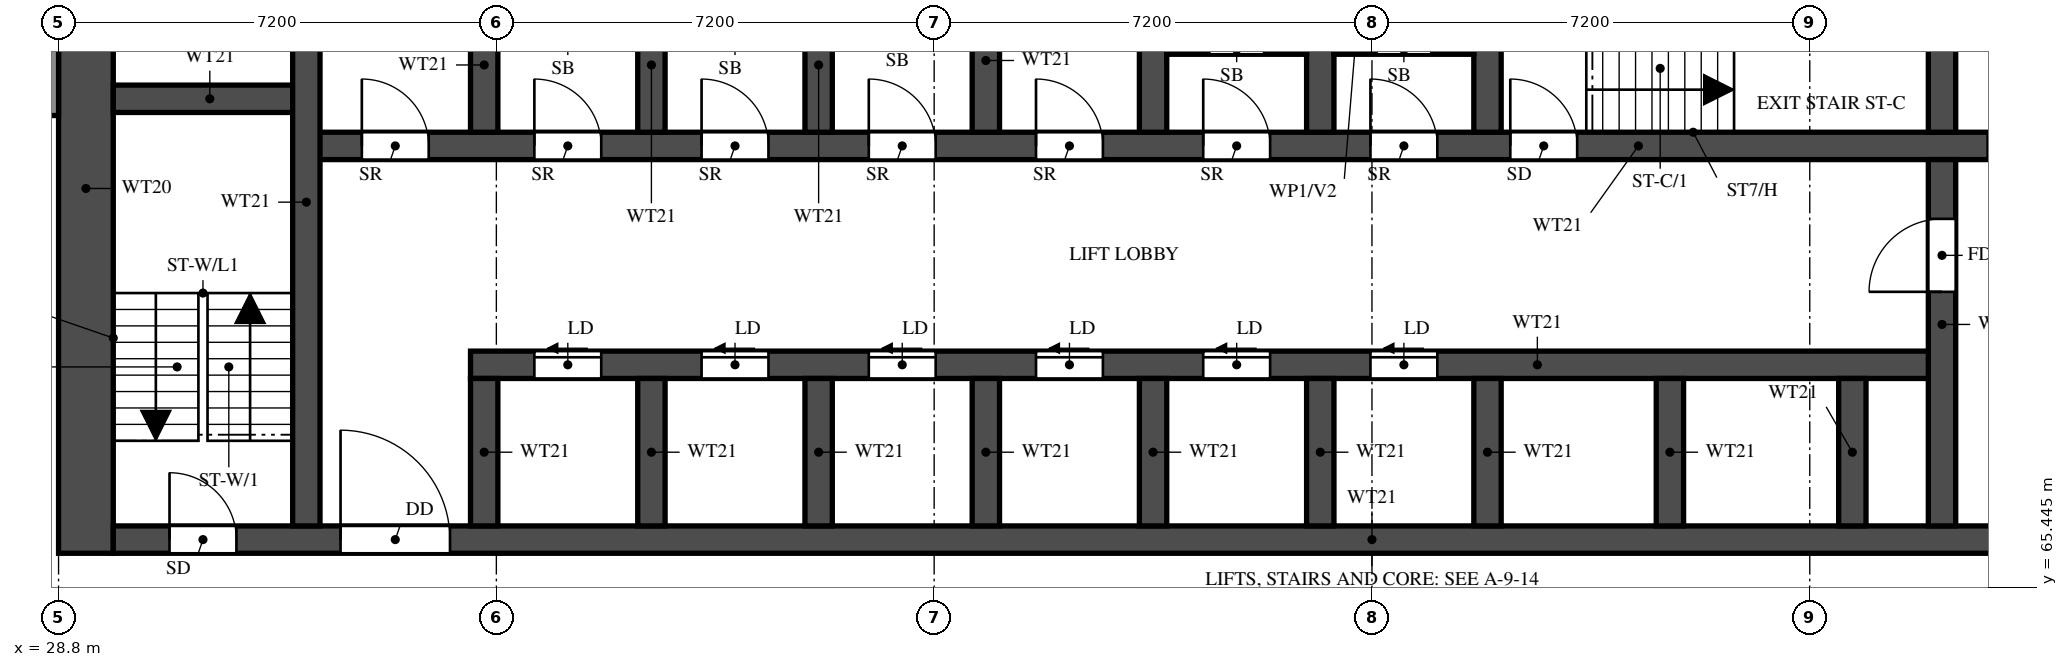
"""IFC4 building model, lengths in metres.
Left out: names, types, materials, properties, quantities, classifications, styles, units other than length and angle.
Written with IfcOpenShell. Run it as: python <this file> out.ifc"""

import sys

from ifc_helpers import new_model, si_unit, direction, frame, frame_2d, origin, place, context, subcontext, project, spatial, rectangle, extrude, element, fill, save


model = new_model("IFC4")
c1 = context("Model", 3, precision=1e-05, world=origin(), true_north=direction((0.0, 1.0)))
c2 = subcontext(c1, "Body", "Model", "MODEL_VIEW")
j1 = project(units=[si_unit("LENGTHUNIT", "METRE"), si_unit("PLANEANGLEUNIT", "RADIAN")], contexts=[c1])
p1 = place(None, origin())
s1 = spatial("IfcSite", under=j1, at=p1, CompositionType="ELEMENT")
p2 = place(p1, origin())
s2 = spatial("IfcBuilding", under=s1, at=p2, CompositionType="ELEMENT")
p3 = place(p2, frame((0.0, 0.0, 97.0)))
s3 = spatial("IfcBuildingStorey", under=s2, at=p3, CompositionType="ELEMENT", Elevation=97.0)
p4 = place(p3, frame((29.25, 66.0, 0.0), z_axis=(0.0, 0.0, 1.0), x_axis=(0.0, 1.0, 0.0)))
e1 = element("IfcWall", 1, at=p4, inside=s3, PredefinedType="SHEAR", context=c2, shape_type="SweptSolid", body=[
    extrude(rectangle(XDim=12.0, YDim=0.9, at=frame_2d((6.0, 0.0))), origin(), (0.0, 0.0, 1.0), 3.18),
])
p5 = place(p3, frame((29.7, 66.225, 0.0), z_axis=(0.0, 0.0, 1.0), x_axis=(1.0, 0.0, 0.0)))
e2 = element("IfcWall", 2, at=p5, inside=s3, PredefinedType="SHEAR", context=c2, shape_type="SweptSolid", body=[
    extrude(rectangle(XDim=41.4, YDim=0.45, at=frame_2d((20.7, 0.0))), origin(), (0.0, 0.0, 1.0), 3.18),
])
p6 = place(p5, frame((0.925, 0.0, 0.0)))
e3 = element("IfcOpeningElement", 3, at=p6, cuts=e2, PredefinedType="OPENING", context=c2, shape_type="SweptSolid", body=[
    extrude(rectangle(XDim=1.1, YDim=2.1, at=frame_2d((0.55, 1.05))), frame((0.0, 0.235, 0.0), z_axis=(0.0, -1.0, 0.0), x_axis=(1.0, 0.0, 0.0)), (0.0, 0.0, 1.0), 0.47),
])
p7 = place(p5, frame((3.738, 0.0, 0.0)))
e4 = element("IfcOpeningElement", 4, at=p7, cuts=e2, PredefinedType="OPENING", context=c2, shape_type="SweptSolid", body=[
    extrude(rectangle(XDim=1.8, YDim=2.1, at=frame_2d((0.9, 1.05))), frame((0.0, 0.235, 0.0), z_axis=(0.0, -1.0, 0.0), x_axis=(1.0, 0.0, 0.0)), (0.0, 0.0, 1.0), 0.47),
])
p8 = place(p3, frame((35.575, 69.1, 0.0), z_axis=(0.0, 0.0, 1.0), x_axis=(1.0, 0.0, 0.0)))
e5 = element("IfcWall", 5, at=p8, inside=s3, PredefinedType="SHEAR", context=c2, shape_type="SweptSolid", body=[
    extrude(rectangle(XDim=24.2, YDim=0.45, at=frame_2d((12.1, 0.0))), origin(), (0.0, 0.0, 1.0), 3.18),
])
p9 = place(p8, frame((1.05, 0.0, 0.0)))
e6 = element("IfcOpeningElement", 6, at=p9, cuts=e5, PredefinedType="OPENING", context=c2, shape_type="SweptSolid", body=[
    extrude(rectangle(XDim=1.1, YDim=2.1, at=frame_2d((0.55, 1.05))), frame((0.0, 0.235, 0.0), z_axis=(0.0, -1.0, 0.0), x_axis=(1.0, 0.0, 0.0)), (0.0, 0.0, 1.0), 0.47),
])
p10 = place(p8, frame((3.8, 0.0, 0.0)))
e7 = element("IfcOpeningElement", 7, at=p10, cuts=e5, PredefinedType="OPENING", context=c2, shape_type="SweptSolid", body=[
    extrude(rectangle(XDim=1.1, YDim=2.1, at=frame_2d((0.55, 1.05))), frame((0.0, 0.235, 0.0), z_axis=(0.0, -1.0, 0.0), x_axis=(1.0, 0.0, 0.0)), (0.0, 0.0, 1.0), 0.47),
])
p11 = place(p8, frame((6.55, 0.0, 0.0)))
e8 = element("IfcOpeningElement", 8, at=p11, cuts=e5, PredefinedType="OPENING", context=c2, shape_type="SweptSolid", body=[
    extrude(rectangle(XDim=1.1, YDim=2.1, at=frame_2d((0.55, 1.05))), frame((0.0, 0.235, 0.0), z_axis=(0.0, -1.0, 0.0), x_axis=(1.0, 0.0, 0.0)), (0.0, 0.0, 1.0), 0.47),
])
p12 = place(p8, frame((9.3, 0.0, 0.0)))
e9 = element("IfcOpeningElement", 9, at=p12, cuts=e5, PredefinedType="OPENING", context=c2, shape_type="SweptSolid", body=[
    extrude(rectangle(XDim=1.1, YDim=2.1, at=frame_2d((0.55, 1.05))), frame((0.0, 0.235, 0.0), z_axis=(0.0, -1.0, 0.0), x_axis=(1.0, 0.0, 0.0)), (0.0, 0.0, 1.0), 0.47),
])
p13 = place(p8, frame((12.05, 0.0, 0.0)))
e10 = element("IfcOpeningElement", 10, at=p13, cuts=e5, PredefinedType="OPENING", context=c2, shape_type="SweptSolid", body=[
    extrude(rectangle(XDim=1.1, YDim=2.1, at=frame_2d((0.55, 1.05))), frame((0.0, 0.235, 0.0), z_axis=(0.0, -1.0, 0.0), x_axis=(1.0, 0.0, 0.0)), (0.0, 0.0, 1.0), 0.47),
])
p14 = place(p8, frame((14.8, 0.0, 0.0)))
e11 = element("IfcOpeningElement", 11, at=p14, cuts=e5, PredefinedType="OPENING", context=c2, shape_type="SweptSolid", body=[
    extrude(rectangle(XDim=1.1, YDim=2.1, at=frame_2d((0.55, 1.05))), frame((0.0, 0.235, 0.0), z_axis=(0.0, -1.0, 0.0), x_axis=(1.0, 0.0, 0.0)), (0.0, 0.0, 1.0), 0.47),
])
p15 = place(p3, frame((32.875, 72.7, 0.0), z_axis=(0.0, 0.0, 1.0), x_axis=(1.0, 0.0, 0.0)))
e12 = element("IfcWall", 12, at=p15, inside=s3, PredefinedType="SHEAR", context=c2, shape_type="SweptSolid", body=[
    extrude(rectangle(XDim=35.05, YDim=0.45, at=frame_2d((17.525, 0.0))), origin(), (0.0, 0.0, 1.0), 3.18),
])
p16 = place(p15, frame((19.8, 0.0, 0.0)))
e13 = element("IfcOpeningElement", 13, at=p16, cuts=e12, PredefinedType="OPENING", context=c2, shape_type="SweptSolid", body=[
    extrude(rectangle(XDim=1.1, YDim=2.1, at=frame_2d((0.55, 1.05))), frame((0.0, 0.235, 0.0), z_axis=(0.0, -1.0, 0.0), x_axis=(1.0, 0.0, 0.0)), (0.0, 0.0, 1.0), 0.47),
])
p17 = place(p15, frame((27.65, 0.0, 0.0)))
e14 = element("IfcOpeningElement", 14, at=p17, cuts=e12, PredefinedType="OPENING", context=c2, shape_type="SweptSolid", body=[
    extrude(rectangle(XDim=1.1, YDim=2.1, at=frame_2d((0.55, 1.05))), frame((0.0, 0.235, 0.0), z_axis=(0.0, -1.0, 0.0), x_axis=(1.0, 0.0, 0.0)), (0.0, 0.0, 1.0), 0.47),
])
p18 = place(p15, frame((30.25, 0.0, 0.0)))
e15 = element("IfcOpeningElement", 15, at=p18, cuts=e12, PredefinedType="OPENING", context=c2, shape_type="SweptSolid", body=[
    extrude(rectangle(XDim=1.1, YDim=2.1, at=frame_2d((0.55, 1.05))), frame((0.0, 0.235, 0.0), z_axis=(0.0, -1.0, 0.0), x_axis=(1.0, 0.0, 0.0)), (0.0, 0.0, 1.0), 0.47),
])
p19 = place(p15, frame((3.75, 0.0, 0.0)))
e16 = element("IfcOpeningElement", 16, at=p19, cuts=e12, PredefinedType="OPENING", context=c2, shape_type="SweptSolid", body=[
    extrude(rectangle(XDim=1.1, YDim=2.1, at=frame_2d((0.55, 1.05))), frame((0.0, 0.235, 0.0), z_axis=(0.0, -1.0, 0.0), x_axis=(1.0, 0.0, 0.0)), (0.0, 0.0, 1.0), 0.47),
])
p20 = place(p15, frame((6.5, 0.0, 0.0)))
e17 = element("IfcOpeningElement", 17, at=p20, cuts=e12, PredefinedType="OPENING", context=c2, shape_type="SweptSolid", body=[
    extrude(rectangle(XDim=1.1, YDim=2.1, at=frame_2d((0.55, 1.05))), frame((0.0, 0.235, 0.0), z_axis=(0.0, -1.0, 0.0), x_axis=(1.0, 0.0, 0.0)), (0.0, 0.0, 1.0), 0.47),
])
p21 = place(p15, frame((9.25, 0.0, 0.0)))
e18 = element("IfcOpeningElement", 18, at=p21, cuts=e12, PredefinedType="OPENING", context=c2, shape_type="SweptSolid", body=[
    extrude(rectangle(XDim=1.1, YDim=2.1, at=frame_2d((0.55, 1.05))), frame((0.0, 0.235, 0.0), z_axis=(0.0, -1.0, 0.0), x_axis=(1.0, 0.0, 0.0)), (0.0, 0.0, 1.0), 0.47),
])
p22 = place(p15, frame((12.0, 0.0, 0.0)))
e19 = element("IfcOpeningElement", 19, at=p22, cuts=e12, PredefinedType="OPENING", context=c2, shape_type="SweptSolid", body=[
    extrude(rectangle(XDim=1.1, YDim=2.1, at=frame_2d((0.55, 1.05))), frame((0.0, 0.235, 0.0), z_axis=(0.0, -1.0, 0.0), x_axis=(1.0, 0.0, 0.0)), (0.0, 0.0, 1.0), 0.47),
])
p23 = place(p15, frame((14.75, 0.0, 0.0)))
e20 = element("IfcOpeningElement", 20, at=p23, cuts=e12, PredefinedType="OPENING", context=c2, shape_type="SweptSolid", body=[
    extrude(rectangle(XDim=1.1, YDim=2.1, at=frame_2d((0.55, 1.05))), frame((0.0, 0.235, 0.0), z_axis=(0.0, -1.0, 0.0), x_axis=(1.0, 0.0, 0.0)), (0.0, 0.0, 1.0), 0.47),
])
p24 = place(p15, frame((17.5, 0.0, 0.0)))
e21 = element("IfcOpeningElement", 21, at=p24, cuts=e12, PredefinedType="OPENING", context=c2, shape_type="SweptSolid", body=[
    extrude(rectangle(XDim=1.1, YDim=2.1, at=frame_2d((0.55, 1.05))), frame((0.0, 0.235, 0.0), z_axis=(0.0, -1.0, 0.0), x_axis=(1.0, 0.0, 0.0)), (0.0, 0.0, 1.0), 0.47),
])
p25 = place(p15, frame((0.913, 0.0, 0.0)))
e22 = element("IfcOpeningElement", 22, at=p25, cuts=e12, PredefinedType="OPENING", context=c2, shape_type="SweptSolid", body=[
    extrude(rectangle(XDim=1.1, YDim=2.1, at=frame_2d((0.55, 1.05))), frame((0.0, 0.235, 0.0), z_axis=(0.0, -1.0, 0.0), x_axis=(1.0, 0.0, 0.0)), (0.0, 0.0, 1.0), 0.47),
])
p26 = place(p3, frame((29.7, 73.475, 0.0), z_axis=(0.0, 0.0, 1.0), x_axis=(1.0, 0.0, 0.0)))
e23 = element("IfcWall", 23, at=p26, inside=s3, PredefinedType="SHEAR", context=c2, shape_type="SweptSolid", body=[
    extrude(rectangle(XDim=3.175, YDim=0.45, at=frame_2d((1.587, 0.0))), origin(), (0.0, 0.0, 1.0), 3.18),
])
p27 = place(p3, frame((32.875, 66.45, 0.0), z_axis=(0.0, 0.0, 1.0), x_axis=(0.0, 1.0, 0.0)))
e24 = element("IfcWall", 24, at=p27, inside=s3, PredefinedType="SHEAR", context=c2, shape_type="SweptSolid", body=[
    extrude(rectangle(XDim=10.65, YDim=0.45, at=frame_2d((5.325, 0.0))), origin(), (0.0, 0.0, 1.0), 3.18),
])
p28 = place(p3, frame((59.775, 66.45, 0.0), z_axis=(0.0, 0.0, 1.0), x_axis=(0.0, 1.0, 0.0)))
e25 = element("IfcWall", 25, at=p28, inside=s3, PredefinedType="SHEAR", context=c2, shape_type="SweptSolid", body=[
    extrude(rectangle(XDim=6.025, YDim=0.45, at=frame_2d((3.013, 0.0))), origin(), (0.0, 0.0, 1.0), 3.18),
])
p29 = place(p28, frame((3.85, 0.0, 0.0)))
e26 = element("IfcOpeningElement", 26, at=p29, cuts=e25, PredefinedType="OPENING", context=c2, shape_type="SweptSolid", body=[
    extrude(rectangle(XDim=1.2, YDim=2.1, at=frame_2d((0.6, 1.05))), frame((0.0, 0.235, 0.0), z_axis=(0.0, -1.0, 0.0), x_axis=(1.0, 0.0, 0.0)), (0.0, 0.0, 1.0), 0.47),
])
p30 = place(p3, frame((59.775, 72.925, 0.0), z_axis=(0.0, 0.0, 1.0), x_axis=(0.0, 1.0, 0.0)))
e27 = element("IfcWall", 27, at=p30, inside=s3, PredefinedType="SHEAR", context=c2, shape_type="SweptSolid", body=[
    extrude(rectangle(XDim=2.95, YDim=0.45, at=frame_2d((1.475, 0.0))), origin(), (0.0, 0.0, 1.0), 3.18),
])
for number, where, z_axis, x_axis in (
    (28, (35.8, 66.45, 0.0), (0.0, 0.0, 1.0), (0.0, 1.0, 0.0)),
    (29, (38.55, 66.45, 0.0), (0.0, 0.0, 1.0), (0.0, 1.0, 0.0)),
    (30, (41.3, 66.45, 0.0), (0.0, 0.0, 1.0), (0.0, 1.0, 0.0)),
    (31, (44.05, 66.45, 0.0), (0.0, 0.0, 1.0), (0.0, 1.0, 0.0)),
    (32, (46.8, 66.45, 0.0), (0.0, 0.0, 1.0), (0.0, 1.0, 0.0)),
    (33, (49.55, 66.45, 0.0), (0.0, 0.0, 1.0), (0.0, 1.0, 0.0)),
    (34, (52.3, 66.45, 0.0), (0.0, 0.0, 1.0), (0.0, 1.0, 0.0)),
    (35, (55.3, 66.45, 0.0), (0.0, 0.0, 1.0), (0.0, 1.0, 0.0)),
    (36, (58.3, 66.45, 0.0), (0.0, 0.0, 1.0), (0.0, 1.0, 0.0)),
):
    element("IfcWall", number, at=place(p3, frame(where, z_axis=z_axis, x_axis=x_axis)), inside=s3, PredefinedType="SHEAR", context=c2, shape_type="SweptSolid", body=[
        extrude(rectangle(XDim=2.425, YDim=0.45, at=frame_2d((1.212, 0.0))), origin(), (0.0, 0.0, 1.0), 3.18),
    ])
for number, where, z_axis, x_axis in (
    (37, (35.8, 72.925, 0.0), (0.0, 0.0, 1.0), (0.0, 1.0, 0.0)),
    (38, (38.55, 72.925, 0.0), (0.0, 0.0, 1.0), (0.0, 1.0, 0.0)),
    (39, (41.3, 72.925, 0.0), (0.0, 0.0, 1.0), (0.0, 1.0, 0.0)),
    (40, (44.05, 72.925, 0.0), (0.0, 0.0, 1.0), (0.0, 1.0, 0.0)),
    (41, (46.8, 72.925, 0.0), (0.0, 0.0, 1.0), (0.0, 1.0, 0.0)),
    (42, (49.55, 72.925, 0.0), (0.0, 0.0, 1.0), (0.0, 1.0, 0.0)),
    (43, (52.3, 72.925, 0.0), (0.0, 0.0, 1.0), (0.0, 1.0, 0.0)),
):
    element("IfcWall", number, at=place(p3, frame(where, z_axis=z_axis, x_axis=x_axis)), inside=s3, PredefinedType="SHEAR", context=c2, shape_type="SweptSolid", body=[
        extrude(rectangle(XDim=2.95, YDim=0.45, at=frame_2d((1.475, 0.0))), origin(), (0.0, 0.0, 1.0), 3.18),
    ])
p31 = place(p3, frame((47.025, 74.282, 0.0), z_axis=(0.0, 0.0, 1.0), x_axis=(1.0, 0.0, 0.0)))
e44 = element("IfcWall", 44, at=p31, inside=s3, PredefinedType="PARTITIONING", context=c2, shape_type="SweptSolid", body=[
    extrude(rectangle(XDim=2.3, YDim=0.15, at=frame_2d((1.15, 0.0))), origin(), (0.0, 0.0, 1.0), 3.18),
])
p32 = place(p31, frame((0.7, 0.0, 0.0)))
e45 = element("IfcOpeningElement", 45, at=p32, cuts=e44, PredefinedType="OPENING", context=c2, shape_type="SweptSolid", body=[
    extrude(rectangle(XDim=0.9, YDim=2.1, at=frame_2d((0.45, 1.05))), frame((0.0, 0.085, 0.0), z_axis=(0.0, -1.0, 0.0), x_axis=(1.0, 0.0, 0.0)), (0.0, 0.0, 1.0), 0.17),
])
p33 = place(p3, frame((49.775, 74.282, 0.0), z_axis=(0.0, 0.0, 1.0), x_axis=(1.0, 0.0, 0.0)))
e46 = element("IfcWall", 46, at=p33, inside=s3, PredefinedType="PARTITIONING", context=c2, shape_type="SweptSolid", body=[
    extrude(rectangle(XDim=2.3, YDim=0.15, at=frame_2d((1.15, 0.0))), origin(), (0.0, 0.0, 1.0), 3.18),
])
p34 = place(p33, frame((0.7, 0.0, 0.0)))
e47 = element("IfcOpeningElement", 47, at=p34, cuts=e46, PredefinedType="OPENING", context=c2, shape_type="SweptSolid", body=[
    extrude(rectangle(XDim=0.9, YDim=2.1, at=frame_2d((0.45, 1.05))), frame((0.0, 0.085, 0.0), z_axis=(0.0, -1.0, 0.0), x_axis=(1.0, 0.0, 0.0)), (0.0, 0.0, 1.0), 0.17),
])
p35 = place(p3, frame((28.7, 73.2, 0.0), z_axis=(0.0, 0.0, 1.0), x_axis=(0.0, 1.0, 0.0)))
e48 = element("IfcWall", 48, at=p35, inside=s3, PredefinedType="SOLIDWALL", context=c2, shape_type="SweptSolid", body=[
    extrude(rectangle(XDim=4.8, YDim=0.2, at=frame_2d((2.4, 0.0))), origin(), (0.0, 0.0, 1.0), 3.18),
])
p36 = place(p6, origin())
e49 = element("IfcDoor", 49, at=p36, inside=s3, OperationType="SINGLE_SWING_LEFT", PredefinedType="DOOR", context=c2, shape_type="SweptSolid", body=[
    extrude(rectangle(XDim=1.1, YDim=2.1, at=frame_2d((0.55, 1.05))), frame((0.0, 0.025, 0.0), z_axis=(0.0, -1.0, 0.0), x_axis=(1.0, 0.0, 0.0)), (0.0, 0.0, 1.0), 0.05),
])
fill(e3, e49)
p37 = place(p16, origin())
e50 = element("IfcDoor", 50, at=p37, inside=s3, OperationType="SINGLE_SWING_LEFT", PredefinedType="DOOR", context=c2, shape_type="SweptSolid", body=[
    extrude(rectangle(XDim=1.1, YDim=2.1, at=frame_2d((0.55, 1.05))), frame((0.0, 0.025, 0.0), z_axis=(0.0, -1.0, 0.0), x_axis=(1.0, 0.0, 0.0)), (0.0, 0.0, 1.0), 0.05),
])
fill(e13, e50)
p38 = place(p7, origin())
e51 = element("IfcDoor", 51, at=p38, inside=s3, OperationType="DOUBLE_DOOR_SINGLE_SWING", PredefinedType="DOOR", context=c2, shape_type="SweptSolid", body=[
    extrude(rectangle(XDim=1.8, YDim=2.1, at=frame_2d((0.9, 1.05))), frame((0.0, 0.025, 0.0), z_axis=(0.0, -1.0, 0.0), x_axis=(1.0, 0.0, 0.0)), (0.0, 0.0, 1.0), 0.05),
])
fill(e4, e51)
p39 = place(p29, origin())
e52 = element("IfcDoor", 52, at=p39, inside=s3, OperationType="SINGLE_SWING_RIGHT", PredefinedType="DOOR", context=c2, shape_type="SweptSolid", body=[
    extrude(rectangle(XDim=1.2, YDim=2.1, at=frame_2d((0.6, 1.05))), frame((0.0, 0.025, 0.0), z_axis=(0.0, -1.0, 0.0), x_axis=(1.0, 0.0, 0.0)), (0.0, 0.0, 1.0), 0.05),
])
fill(e26, e52)
p40 = place(p17, origin())
e53 = element("IfcDoor", 53, at=p40, inside=s3, OperationType="SLIDING_TO_LEFT", PredefinedType="DOOR", context=c2, shape_type="SweptSolid", body=[
    extrude(rectangle(XDim=1.1, YDim=2.1, at=frame_2d((0.55, 1.05))), frame((0.0, 0.025, 0.0), z_axis=(0.0, -1.0, 0.0), x_axis=(1.0, 0.0, 0.0)), (0.0, 0.0, 1.0), 0.05),
])
fill(e14, e53)
p41 = place(p9, origin())
e54 = element("IfcDoor", 54, at=p41, inside=s3, OperationType="SLIDING_TO_LEFT", PredefinedType="DOOR", context=c2, shape_type="SweptSolid", body=[
    extrude(rectangle(XDim=1.1, YDim=2.1, at=frame_2d((0.55, 1.05))), frame((0.0, 0.025, 0.0), z_axis=(0.0, -1.0, 0.0), x_axis=(1.0, 0.0, 0.0)), (0.0, 0.0, 1.0), 0.05),
])
fill(e6, e54)
p42 = place(p10, origin())
e55 = element("IfcDoor", 55, at=p42, inside=s3, OperationType="SLIDING_TO_LEFT", PredefinedType="DOOR", context=c2, shape_type="SweptSolid", body=[
    extrude(rectangle(XDim=1.1, YDim=2.1, at=frame_2d((0.55, 1.05))), frame((0.0, 0.025, 0.0), z_axis=(0.0, -1.0, 0.0), x_axis=(1.0, 0.0, 0.0)), (0.0, 0.0, 1.0), 0.05),
])
fill(e7, e55)
p43 = place(p11, origin())
e56 = element("IfcDoor", 56, at=p43, inside=s3, OperationType="SLIDING_TO_LEFT", PredefinedType="DOOR", context=c2, shape_type="SweptSolid", body=[
    extrude(rectangle(XDim=1.1, YDim=2.1, at=frame_2d((0.55, 1.05))), frame((0.0, 0.025, 0.0), z_axis=(0.0, -1.0, 0.0), x_axis=(1.0, 0.0, 0.0)), (0.0, 0.0, 1.0), 0.05),
])
fill(e8, e56)
p44 = place(p12, origin())
e57 = element("IfcDoor", 57, at=p44, inside=s3, OperationType="SLIDING_TO_LEFT", PredefinedType="DOOR", context=c2, shape_type="SweptSolid", body=[
    extrude(rectangle(XDim=1.1, YDim=2.1, at=frame_2d((0.55, 1.05))), frame((0.0, 0.025, 0.0), z_axis=(0.0, -1.0, 0.0), x_axis=(1.0, 0.0, 0.0)), (0.0, 0.0, 1.0), 0.05),
])
fill(e9, e57)
p45 = place(p13, origin())
e58 = element("IfcDoor", 58, at=p45, inside=s3, OperationType="SLIDING_TO_LEFT", PredefinedType="DOOR", context=c2, shape_type="SweptSolid", body=[
    extrude(rectangle(XDim=1.1, YDim=2.1, at=frame_2d((0.55, 1.05))), frame((0.0, 0.025, 0.0), z_axis=(0.0, -1.0, 0.0), x_axis=(1.0, 0.0, 0.0)), (0.0, 0.0, 1.0), 0.05),
])
fill(e10, e58)
p46 = place(p14, origin())
e59 = element("IfcDoor", 59, at=p46, inside=s3, OperationType="SLIDING_TO_LEFT", PredefinedType="DOOR", context=c2, shape_type="SweptSolid", body=[
    extrude(rectangle(XDim=1.1, YDim=2.1, at=frame_2d((0.55, 1.05))), frame((0.0, 0.025, 0.0), z_axis=(0.0, -1.0, 0.0), x_axis=(1.0, 0.0, 0.0)), (0.0, 0.0, 1.0), 0.05),
])
fill(e11, e59)
p47 = place(p19, origin())
e60 = element("IfcDoor", 60, at=p47, inside=s3, OperationType="SINGLE_SWING_LEFT", PredefinedType="DOOR", context=c2, shape_type="SweptSolid", body=[
    extrude(rectangle(XDim=1.1, YDim=2.1, at=frame_2d((0.55, 1.05))), frame((0.0, 0.025, 0.0), z_axis=(0.0, -1.0, 0.0), x_axis=(1.0, 0.0, 0.0)), (0.0, 0.0, 1.0), 0.05),
])
fill(e16, e60)
p48 = place(p20, origin())
e61 = element("IfcDoor", 61, at=p48, inside=s3, OperationType="SINGLE_SWING_LEFT", PredefinedType="DOOR", context=c2, shape_type="SweptSolid", body=[
    extrude(rectangle(XDim=1.1, YDim=2.1, at=frame_2d((0.55, 1.05))), frame((0.0, 0.025, 0.0), z_axis=(0.0, -1.0, 0.0), x_axis=(1.0, 0.0, 0.0)), (0.0, 0.0, 1.0), 0.05),
])
fill(e17, e61)
p49 = place(p21, origin())
e62 = element("IfcDoor", 62, at=p49, inside=s3, OperationType="SINGLE_SWING_LEFT", PredefinedType="DOOR", context=c2, shape_type="SweptSolid", body=[
    extrude(rectangle(XDim=1.1, YDim=2.1, at=frame_2d((0.55, 1.05))), frame((0.0, 0.025, 0.0), z_axis=(0.0, -1.0, 0.0), x_axis=(1.0, 0.0, 0.0)), (0.0, 0.0, 1.0), 0.05),
])
fill(e18, e62)
p50 = place(p22, origin())
e63 = element("IfcDoor", 63, at=p50, inside=s3, OperationType="SINGLE_SWING_LEFT", PredefinedType="DOOR", context=c2, shape_type="SweptSolid", body=[
    extrude(rectangle(XDim=1.1, YDim=2.1, at=frame_2d((0.55, 1.05))), frame((0.0, 0.025, 0.0), z_axis=(0.0, -1.0, 0.0), x_axis=(1.0, 0.0, 0.0)), (0.0, 0.0, 1.0), 0.05),
])
fill(e19, e63)
p51 = place(p23, origin())
e64 = element("IfcDoor", 64, at=p51, inside=s3, OperationType="SINGLE_SWING_LEFT", PredefinedType="DOOR", context=c2, shape_type="SweptSolid", body=[
    extrude(rectangle(XDim=1.1, YDim=2.1, at=frame_2d((0.55, 1.05))), frame((0.0, 0.025, 0.0), z_axis=(0.0, -1.0, 0.0), x_axis=(1.0, 0.0, 0.0)), (0.0, 0.0, 1.0), 0.05),
])
fill(e20, e64)
p52 = place(p24, origin())
e65 = element("IfcDoor", 65, at=p52, inside=s3, OperationType="SINGLE_SWING_LEFT", PredefinedType="DOOR", context=c2, shape_type="SweptSolid", body=[
    extrude(rectangle(XDim=1.1, YDim=2.1, at=frame_2d((0.55, 1.05))), frame((0.0, 0.025, 0.0), z_axis=(0.0, -1.0, 0.0), x_axis=(1.0, 0.0, 0.0)), (0.0, 0.0, 1.0), 0.05),
])
fill(e21, e65)
p53 = place(p25, origin())
e66 = element("IfcDoor", 66, at=p53, inside=s3, OperationType="SINGLE_SWING_LEFT", PredefinedType="DOOR", context=c2, shape_type="SweptSolid", body=[
    extrude(rectangle(XDim=1.1, YDim=2.1, at=frame_2d((0.55, 1.05))), frame((0.0, 0.025, 0.0), z_axis=(0.0, -1.0, 0.0), x_axis=(1.0, 0.0, 0.0)), (0.0, 0.0, 1.0), 0.05),
])
fill(e22, e66)
save(model, sys.argv[1])
